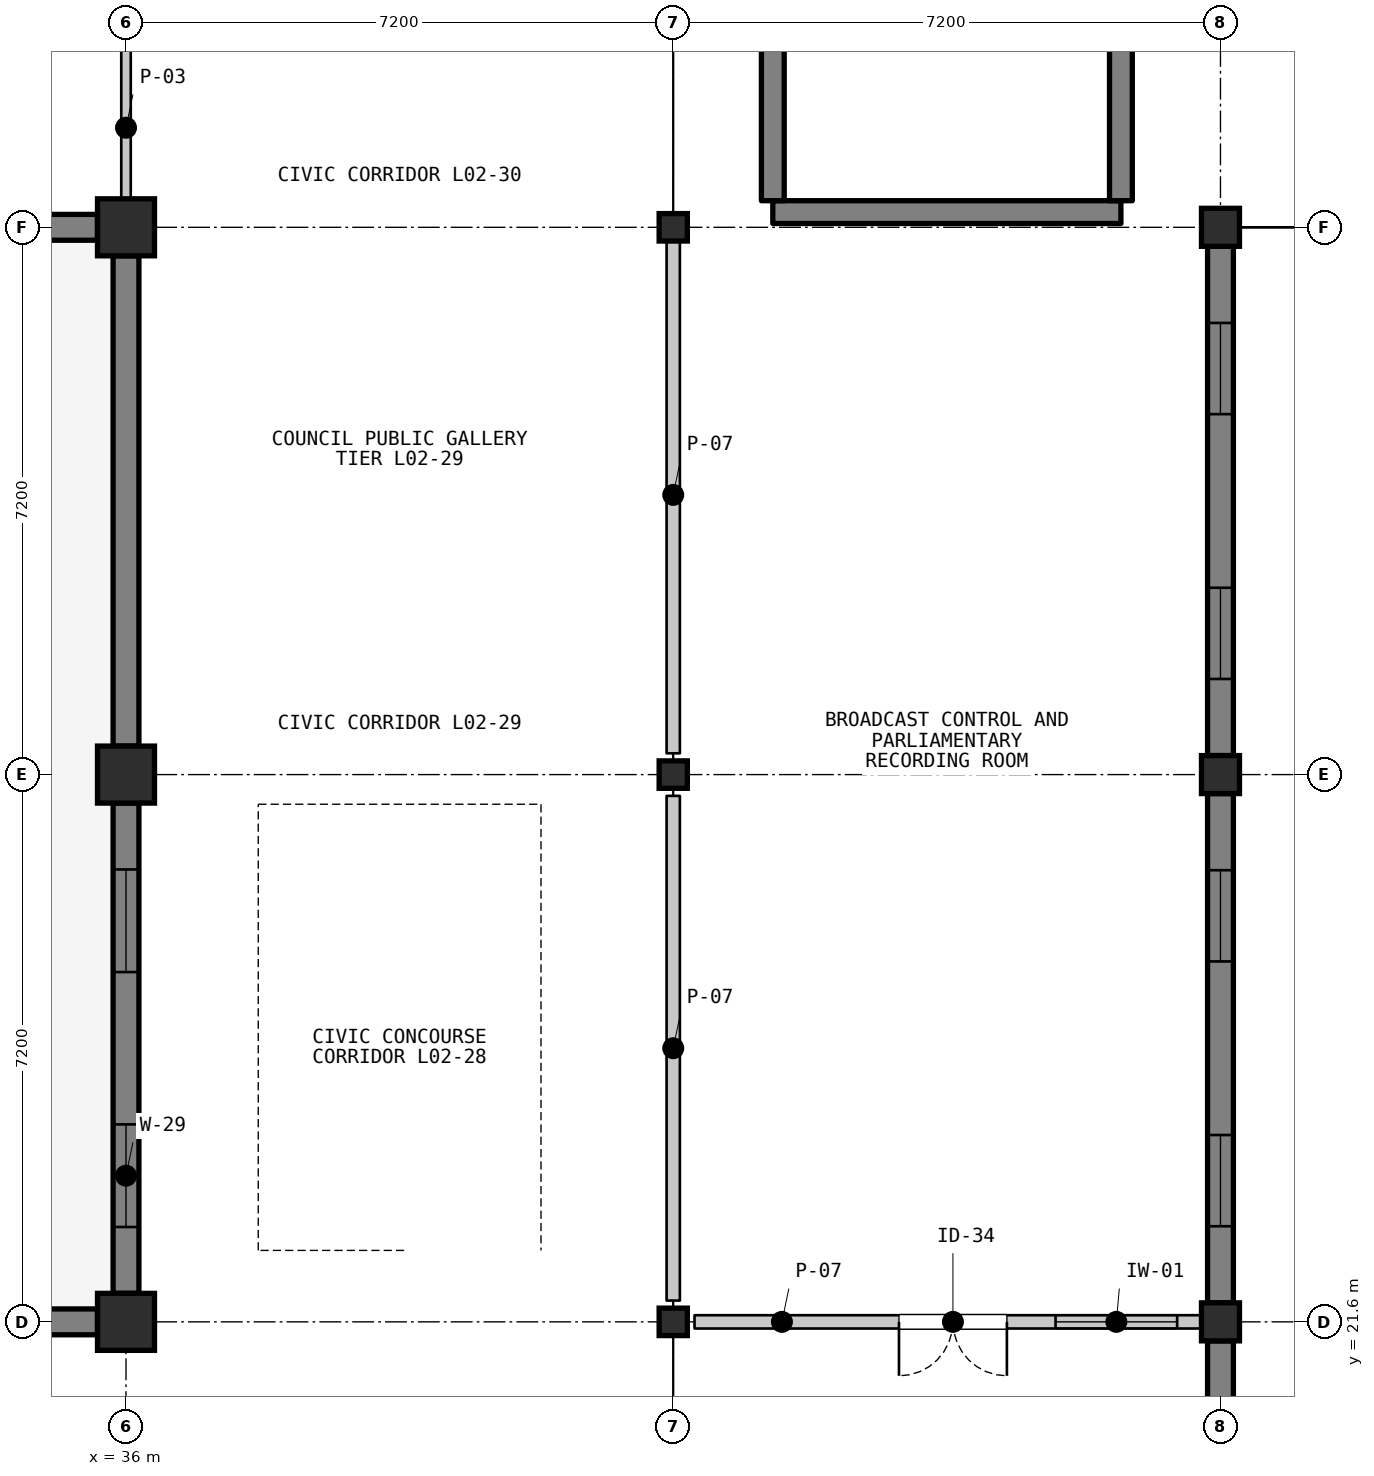
"""IFC4 building model, lengths in metres.
Left out: names, types, materials, properties, quantities, classifications, styles, units other than length and angle.
Written with IfcOpenShell. Run it as: python <this file> out.ifc"""

import sys

from ifc_helpers import new_model, si_unit, direction, frame, frame_2d, origin, origin_2d, place, context, subcontext, project, spatial, rectangle, i_section, extrude, element, fill, save


model = new_model("IFC4")
c1 = context("Model", 3, precision=1e-05, world=origin(), true_north=direction((0.0, 1.0)))
c2 = subcontext(c1, "Body", "Model", "MODEL_VIEW")
j1 = project(units=[si_unit("LENGTHUNIT", "METRE"), si_unit("PLANEANGLEUNIT", "RADIAN")], contexts=[c1])
p1 = place(None, origin())
s1 = spatial("IfcSite", under=j1, at=p1, CompositionType="ELEMENT")
p2 = place(p1, origin())
s2 = spatial("IfcBuilding", under=s1, at=p2, CompositionType="ELEMENT")
p3 = place(p2, frame((0.0, 0.0, 5.4)))
s3 = spatial("IfcBuildingStorey", under=s2, at=p3, CompositionType="ELEMENT", Elevation=5.4)
for number, where, z_axis, x_axis in (
    (1, (36.0, 21.6, 0.0), (0.0, 0.0, 1.0), (1.0, 0.0, 0.0)),
    (2, (36.0, 28.8, 0.0), (0.0, 0.0, 1.0), (1.0, 0.0, 0.0)),
    (3, (36.0, 36.0, 0.0), (0.0, 0.0, 1.0), (1.0, 0.0, 0.0)),
):
    element("IfcColumn", number, at=place(p3, frame(where, z_axis=z_axis, x_axis=x_axis)), inside=s3, PredefinedType="COLUMN", context=c2, shape_type="SweptSolid", body=[
        extrude(rectangle(XDim=0.75, YDim=0.75, at=origin_2d()), origin(), (0.0, 0.0, 1.0), 4.5),
    ])
for number, where, z_axis, x_axis in (
    (4, (43.2, 21.6, 0.0), (0.0, 0.0, 1.0), (1.0, 0.0, 0.0)),
    (5, (43.2, 28.8, 0.0), (0.0, 0.0, 1.0), (1.0, 0.0, 0.0)),
    (6, (43.2, 36.0, 0.0), (0.0, 0.0, 1.0), (1.0, 0.0, 0.0)),
):
    element("IfcColumn", number, at=place(p3, frame(where, z_axis=z_axis, x_axis=x_axis)), inside=s3, PredefinedType="COLUMN", context=c2, shape_type="SweptSolid", body=[
        extrude(i_section(OverallWidth=0.371, OverallDepth=0.361, WebThickness=0.012, FlangeThickness=0.02, FilletRadius=0.015, at=origin_2d()), origin(), (0.0, 0.0, 1.0), 4.5),
    ])
for number, where, z_axis, x_axis in (
    (7, (50.4, 21.6, 0.0), (0.0, 0.0, 1.0), (1.0, 0.0, 0.0)),
    (8, (50.4, 28.8, 0.0), (0.0, 0.0, 1.0), (1.0, 0.0, 0.0)),
    (9, (50.4, 36.0, 0.0), (0.0, 0.0, 1.0), (1.0, 0.0, 0.0)),
):
    element("IfcColumn", number, at=place(p3, frame(where, z_axis=z_axis, x_axis=x_axis)), inside=s3, PredefinedType="COLUMN", context=c2, shape_type="SweptSolid", body=[
        extrude(rectangle(XDim=0.5, YDim=0.5, at=origin_2d()), origin(), (0.0, 0.0, 1.0), 4.5),
    ])
p4 = place(p3, frame((29.175, 21.6, 0.0), z_axis=(0.0, 0.0, 1.0), x_axis=(1.0, 0.0, 0.0)))
e10 = element("IfcWall", 10, at=p4, inside=s3, PredefinedType="SOLIDWALL", context=c2, shape_type="SweptSolid", body=[
    extrude(rectangle(XDim=6.45, YDim=0.34, at=frame_2d((3.225, 0.0))), origin(), (0.0, 0.0, 1.0), 3.698),
])
p5 = place(p3, frame((35.625, 36.0, 0.0), z_axis=(0.0, 0.0, 1.0), x_axis=(-1.0, 0.0, 0.0)))
e11 = element("IfcWall", 11, at=p5, inside=s3, PredefinedType="SOLIDWALL", context=c2, shape_type="SweptSolid", body=[
    extrude(rectangle(XDim=6.575, YDim=0.34, at=frame_2d((3.288, 0.0))), origin(), (0.0, 0.0, 1.0), 4.3),
])
p6 = place(p3, frame((36.0, 21.975, 0.0), z_axis=(0.0, 0.0, 1.0), x_axis=(0.0, 1.0, 0.0)))
e12 = element("IfcWall", 12, at=p6, inside=s3, PredefinedType="SOLIDWALL", context=c2, shape_type="SweptSolid", body=[
    extrude(rectangle(XDim=6.45, YDim=0.34, at=frame_2d((3.225, 0.0))), origin(), (0.0, 0.0, 1.0), 3.767),
])
p7 = place(p6, frame((0.873, 0.0, 0.95)))
e13 = element("IfcOpeningElement", 13, at=p7, cuts=e12, PredefinedType="OPENING", context=c2, shape_type="SweptSolid", body=[
    extrude(rectangle(XDim=1.35, YDim=2.15, at=frame_2d((0.675, 1.075))), frame((0.0, 0.18, 0.0), z_axis=(0.0, -1.0, 0.0), x_axis=(1.0, 0.0, 0.0)), (0.0, 0.0, 1.0), 0.36),
])
p8 = place(p6, frame((4.227, 0.0, 0.95)))
e14 = element("IfcOpeningElement", 14, at=p8, cuts=e12, PredefinedType="OPENING", context=c2, shape_type="SweptSolid", body=[
    extrude(rectangle(XDim=1.35, YDim=2.15, at=frame_2d((0.675, 1.075))), frame((0.0, 0.18, 0.0), z_axis=(0.0, -1.0, 0.0), x_axis=(1.0, 0.0, 0.0)), (0.0, 0.0, 1.0), 0.36),
])
p9 = place(p3, frame((36.0, 29.175, 0.0), z_axis=(0.0, 0.0, 1.0), x_axis=(0.0, 1.0, 0.0)))
e15 = element("IfcWall", 15, at=p9, inside=s3, PredefinedType="SOLIDWALL", context=c2, shape_type="SweptSolid", body=[
    extrude(rectangle(XDim=6.45, YDim=0.34, at=frame_2d((3.225, 0.0))), origin(), (0.0, 0.0, 1.0), 3.767),
])
p10 = place(p3, frame((50.4, 21.35, 0.0), z_axis=(0.0, 0.0, 1.0), x_axis=(0.0, -1.0, 0.0)))
e16 = element("IfcWall", 16, at=p10, inside=s3, PredefinedType="SOLIDWALL", context=c2, shape_type="SweptSolid", body=[
    extrude(rectangle(XDim=6.7, YDim=0.34, at=frame_2d((3.35, 0.0))), origin(), (0.0, 0.0, 1.0), 3.767),
])
p11 = place(p10, frame((0.858, 0.0, 0.95)))
e17 = element("IfcOpeningElement", 17, at=p11, cuts=e16, PredefinedType="OPENING", context=c2, shape_type="SweptSolid", body=[
    extrude(rectangle(XDim=1.5, YDim=2.4, at=frame_2d((0.75, 1.2))), frame((0.0, 0.18, 0.0), z_axis=(0.0, -1.0, 0.0), x_axis=(1.0, 0.0, 0.0)), (0.0, 0.0, 1.0), 0.36),
])
p12 = place(p10, frame((4.342, 0.0, 0.95)))
e18 = element("IfcOpeningElement", 18, at=p12, cuts=e16, PredefinedType="OPENING", context=c2, shape_type="SweptSolid", body=[
    extrude(rectangle(XDim=1.5, YDim=2.4, at=frame_2d((0.75, 1.2))), frame((0.0, 0.18, 0.0), z_axis=(0.0, -1.0, 0.0), x_axis=(1.0, 0.0, 0.0)), (0.0, 0.0, 1.0), 0.36),
])
p13 = place(p3, frame((50.4, 28.55, 0.0), z_axis=(0.0, 0.0, 1.0), x_axis=(0.0, -1.0, 0.0)))
e19 = element("IfcWall", 19, at=p13, inside=s3, PredefinedType="SOLIDWALL", context=c2, shape_type="SweptSolid", body=[
    extrude(rectangle(XDim=6.7, YDim=0.34, at=frame_2d((3.35, 0.0))), origin(), (0.0, 0.0, 1.0), 3.767),
])
p14 = place(p13, frame((1.008, 0.0, 0.95)))
e20 = element("IfcOpeningElement", 20, at=p14, cuts=e19, PredefinedType="OPENING", context=c2, shape_type="SweptSolid", body=[
    extrude(rectangle(XDim=1.2, YDim=2.4, at=frame_2d((0.6, 1.2))), frame((0.0, 0.18, 0.0), z_axis=(0.0, -1.0, 0.0), x_axis=(1.0, 0.0, 0.0)), (0.0, 0.0, 1.0), 0.36),
])
p15 = place(p13, frame((4.492, 0.0, 0.95)))
e21 = element("IfcOpeningElement", 21, at=p15, cuts=e19, PredefinedType="OPENING", context=c2, shape_type="SweptSolid", body=[
    extrude(rectangle(XDim=1.2, YDim=2.4, at=frame_2d((0.6, 1.2))), frame((0.0, 0.18, 0.0), z_axis=(0.0, -1.0, 0.0), x_axis=(1.0, 0.0, 0.0)), (0.0, 0.0, 1.0), 0.36),
])
p16 = place(p3, frame((50.4, 35.75, 0.0), z_axis=(0.0, 0.0, 1.0), x_axis=(0.0, -1.0, 0.0)))
e22 = element("IfcWall", 22, at=p16, inside=s3, PredefinedType="SOLIDWALL", context=c2, shape_type="SweptSolid", body=[
    extrude(rectangle(XDim=6.7, YDim=0.34, at=frame_2d((3.35, 0.0))), origin(), (0.0, 0.0, 1.0), 3.767),
])
p17 = place(p16, frame((1.008, 0.0, 0.95)))
e23 = element("IfcOpeningElement", 23, at=p17, cuts=e22, PredefinedType="OPENING", context=c2, shape_type="SweptSolid", body=[
    extrude(rectangle(XDim=1.2, YDim=1.7, at=frame_2d((0.6, 0.85))), frame((0.0, 0.18, 0.0), z_axis=(0.0, -1.0, 0.0), x_axis=(1.0, 0.0, 0.0)), (0.0, 0.0, 1.0), 0.36),
])
p18 = place(p16, frame((4.492, 0.0, 0.95)))
e24 = element("IfcOpeningElement", 24, at=p18, cuts=e22, PredefinedType="OPENING", context=c2, shape_type="SweptSolid", body=[
    extrude(rectangle(XDim=1.2, YDim=1.7, at=frame_2d((0.6, 0.85))), frame((0.0, 0.18, 0.0), z_axis=(0.0, -1.0, 0.0), x_axis=(1.0, 0.0, 0.0)), (0.0, 0.0, 1.0), 0.36),
])
p19 = place(p3, frame((44.51, 36.2, 0.0), z_axis=(0.0, 0.0, 1.0), x_axis=(1.0, 0.0, 0.0)))
e25 = element("IfcWall", 25, at=p19, inside=s3, PredefinedType="SHEAR", context=c2, shape_type="SweptSolid", body=[
    extrude(rectangle(XDim=4.58, YDim=0.3, at=frame_2d((2.29, 0.0))), origin(), (0.0, 0.0, 1.0), 4.3),
])
for number, where, z_axis, x_axis in (
    (26, (44.51, 36.35, 0.0), (0.0, 0.0, 1.0), (0.0, 1.0, 0.0)),
    (27, (49.09, 36.35, 0.0), (0.0, 0.0, 1.0), (0.0, 1.0, 0.0)),
):
    element("IfcWall", number, at=place(p3, frame(where, z_axis=z_axis, x_axis=x_axis)), inside=s3, PredefinedType="SHEAR", context=c2, shape_type="SweptSolid", body=[
        extrude(rectangle(XDim=9.3, YDim=0.3, at=frame_2d((4.65, 0.0))), origin(), (0.0, 0.0, 1.0), 4.3),
    ])
p20 = place(p3, frame((36.0, 43.08, 0.0), z_axis=(0.0, 0.0, 1.0), x_axis=(0.0, -1.0, 0.0)))
e28 = element("IfcWall", 28, at=p20, inside=s3, PredefinedType="PARTITIONING", context=c2, shape_type="SweptSolid", body=[
    extrude(rectangle(XDim=6.96, YDim=0.125, at=frame_2d((3.48, 0.0))), origin(), (0.0, 0.0, 1.0), 3.688),
])
p21 = place(p20, frame((2.86, 0.0, 0.0)))
e29 = element("IfcOpeningElement", 29, at=p21, cuts=e28, PredefinedType="OPENING", context=c2, shape_type="SweptSolid", body=[
    extrude(rectangle(XDim=1.24, YDim=2.22, at=frame_2d((0.62, 1.11))), frame((0.0, 0.073, 0.0), z_axis=(0.0, -1.0, 0.0), x_axis=(1.0, 0.0, 0.0)), (0.0, 0.0, 1.0), 0.145),
])
p22 = place(p20, frame((0.45, 0.0, 1.05)))
e30 = element("IfcOpeningElement", 30, at=p22, cuts=e28, PredefinedType="OPENING", context=c2, shape_type="SweptSolid", body=[
    extrude(rectangle(XDim=1.28, YDim=1.44, at=frame_2d((0.64, 0.72))), frame((0.0, 0.073, 0.0), z_axis=(0.0, -1.0, 0.0), x_axis=(1.0, 0.0, 0.0)), (0.0, 0.0, 1.0), 0.145),
])
p23 = place(p3, frame((50.28, 21.6, 0.0), z_axis=(0.0, 0.0, 1.0), x_axis=(-1.0, 0.0, 0.0)))
e31 = element("IfcWall", 31, at=p23, inside=s3, PredefinedType="PARTITIONING", context=c2, shape_type="SweptSolid", body=[
    extrude(rectangle(XDim=6.8, YDim=0.175, at=frame_2d((3.4, 0.0))), origin(), (0.0, 0.0, 1.0), 3.688),
])
p24 = place(p23, frame((2.69, 0.0, 0.0)))
e32 = element("IfcOpeningElement", 32, at=p24, cuts=e31, PredefinedType="OPENING", context=c2, shape_type="SweptSolid", body=[
    extrude(rectangle(XDim=1.42, YDim=2.26, at=frame_2d((0.71, 1.13))), frame((0.0, 0.097, 0.0), z_axis=(0.0, -1.0, 0.0), x_axis=(1.0, 0.0, 0.0)), (0.0, 0.0, 1.0), 0.195),
])
p25 = place(p23, frame((0.45, 0.0, 1.05)))
e33 = element("IfcOpeningElement", 33, at=p25, cuts=e31, PredefinedType="OPENING", context=c2, shape_type="SweptSolid", body=[
    extrude(rectangle(XDim=1.6, YDim=1.2, at=frame_2d((0.8, 0.6))), frame((0.0, 0.097, 0.0), z_axis=(0.0, -1.0, 0.0), x_axis=(1.0, 0.0, 0.0)), (0.0, 0.0, 1.0), 0.195),
])
p26 = place(p3, frame((43.2, 21.88, 0.0), z_axis=(0.0, 0.0, 1.0), x_axis=(0.0, 1.0, 0.0)))
e34 = element("IfcWall", 34, at=p26, inside=s3, PredefinedType="PARTITIONING", context=c2, shape_type="SweptSolid", body=[
    extrude(rectangle(XDim=6.64, YDim=0.175, at=frame_2d((3.32, 0.0))), origin(), (0.0, 0.0, 1.0), 3.757),
])
p27 = place(p3, frame((43.2, 29.08, 0.0), z_axis=(0.0, 0.0, 1.0), x_axis=(0.0, 1.0, 0.0)))
e35 = element("IfcWall", 35, at=p27, inside=s3, PredefinedType="PARTITIONING", context=c2, shape_type="SweptSolid", body=[
    extrude(rectangle(XDim=6.8, YDim=0.175, at=frame_2d((3.4, 0.0))), origin(), (0.0, 0.0, 1.0), 3.688),
])
p28 = place(p7, origin())
e36 = element("IfcWindow", 36, at=p28, inside=s3, PartitioningType="SINGLE_PANEL", PredefinedType="WINDOW", context=c2, shape_type="SweptSolid", body=[
    extrude(rectangle(XDim=1.35, YDim=2.15, at=frame_2d((0.675, 1.075))), frame((0.0, 0.03, 0.0), z_axis=(0.0, -1.0, 0.0), x_axis=(1.0, 0.0, 0.0)), (0.0, 0.0, 1.0), 0.06),
])
fill(e13, e36)
p29 = place(p8, origin())
e37 = element("IfcWindow", 37, at=p29, inside=s3, PartitioningType="SINGLE_PANEL", PredefinedType="WINDOW", context=c2, shape_type="SweptSolid", body=[
    extrude(rectangle(XDim=1.35, YDim=2.15, at=frame_2d((0.675, 1.075))), frame((0.0, 0.03, 0.0), z_axis=(0.0, -1.0, 0.0), x_axis=(1.0, 0.0, 0.0)), (0.0, 0.0, 1.0), 0.06),
])
fill(e14, e37)
p30 = place(p14, origin())
e38 = element("IfcWindow", 38, at=p30, inside=s3, PartitioningType="SINGLE_PANEL", PredefinedType="WINDOW", context=c2, shape_type="SweptSolid", body=[
    extrude(rectangle(XDim=1.2, YDim=2.4, at=frame_2d((0.6, 1.2))), frame((0.0, 0.03, 0.0), z_axis=(0.0, -1.0, 0.0), x_axis=(1.0, 0.0, 0.0)), (0.0, 0.0, 1.0), 0.06),
])
fill(e20, e38)
p31 = place(p15, origin())
e39 = element("IfcWindow", 39, at=p31, inside=s3, PartitioningType="SINGLE_PANEL", PredefinedType="WINDOW", context=c2, shape_type="SweptSolid", body=[
    extrude(rectangle(XDim=1.2, YDim=2.4, at=frame_2d((0.6, 1.2))), frame((0.0, 0.03, 0.0), z_axis=(0.0, -1.0, 0.0), x_axis=(1.0, 0.0, 0.0)), (0.0, 0.0, 1.0), 0.06),
])
fill(e21, e39)
p32 = place(p17, origin())
e40 = element("IfcWindow", 40, at=p32, inside=s3, PartitioningType="SINGLE_PANEL", PredefinedType="WINDOW", context=c2, shape_type="SweptSolid", body=[
    extrude(rectangle(XDim=1.2, YDim=1.7, at=frame_2d((0.6, 0.85))), frame((0.0, 0.03, 0.0), z_axis=(0.0, -1.0, 0.0), x_axis=(1.0, 0.0, 0.0)), (0.0, 0.0, 1.0), 0.06),
])
fill(e23, e40)
p33 = place(p18, origin())
e41 = element("IfcWindow", 41, at=p33, inside=s3, PartitioningType="SINGLE_PANEL", PredefinedType="WINDOW", context=c2, shape_type="SweptSolid", body=[
    extrude(rectangle(XDim=1.2, YDim=1.7, at=frame_2d((0.6, 0.85))), frame((0.0, 0.03, 0.0), z_axis=(0.0, -1.0, 0.0), x_axis=(1.0, 0.0, 0.0)), (0.0, 0.0, 1.0), 0.06),
])
fill(e24, e41)
p34 = place(p24, origin())
e42 = element("IfcDoor", 42, at=p34, inside=s3, OperationType="DOUBLE_DOOR_SINGLE_SWING", PredefinedType="DOOR", context=c2, shape_type="SweptSolid", body=[
    extrude(rectangle(XDim=1.42, YDim=2.26, at=frame_2d((0.71, 1.13))), frame((0.0, 0.025, 0.0), z_axis=(0.0, -1.0, 0.0), x_axis=(1.0, 0.0, 0.0)), (0.0, 0.0, 1.0), 0.05),
])
fill(e32, e42)
p35 = place(p25, origin())
e43 = element("IfcWindow", 43, at=p35, inside=s3, PartitioningType="SINGLE_PANEL", PredefinedType="WINDOW", context=c2, shape_type="SweptSolid", body=[
    extrude(rectangle(XDim=1.6, YDim=1.2, at=frame_2d((0.8, 0.6))), frame((0.0, 0.03, 0.0), z_axis=(0.0, -1.0, 0.0), x_axis=(1.0, 0.0, 0.0)), (0.0, 0.0, 1.0), 0.06),
])
fill(e33, e43)
save(model, sys.argv[1])
